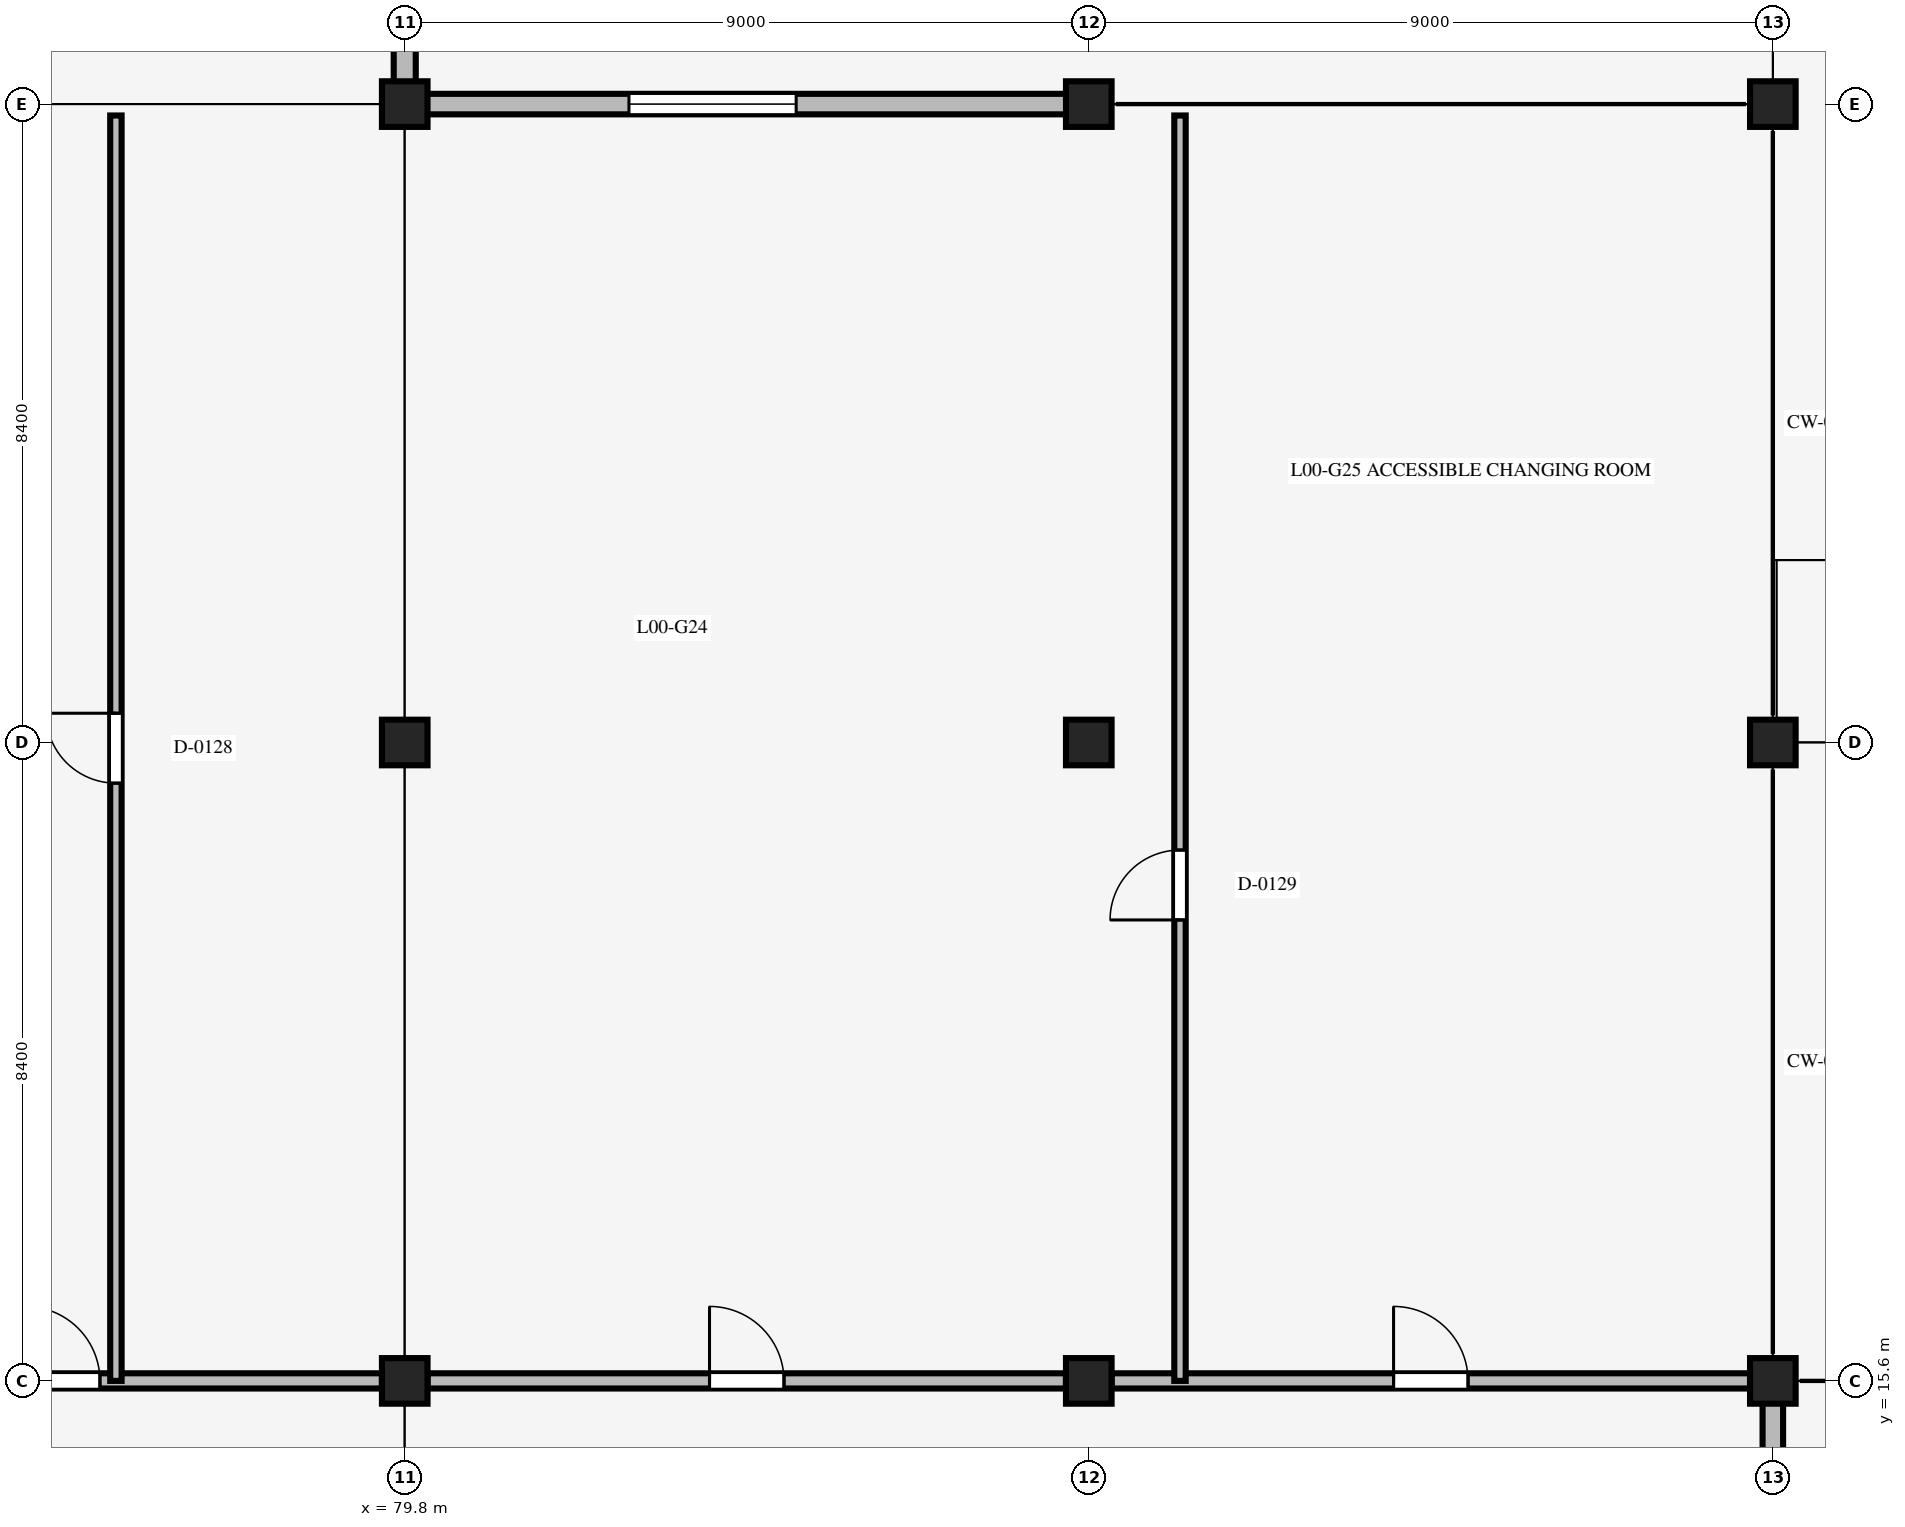
"""IFC4 building model, lengths in metres.
Left out: names, types, materials, properties, quantities, classifications, styles, units other than length and angle.
Written with IfcOpenShell. Run it as: python <this file> out.ifc"""

import sys

from ifc_helpers import new_model, si_unit, direction, frame, frame_2d, origin, origin_2d, place, context, subcontext, project, spatial, rectangle, extrude, element, fill, save


model = new_model("IFC4")
c1 = context("Model", 3, precision=1e-05, world=origin(), true_north=direction((0.0, 1.0)))
c2 = subcontext(c1, "Body", "Model", "MODEL_VIEW")
j1 = project(units=[si_unit("LENGTHUNIT", "METRE"), si_unit("PLANEANGLEUNIT", "RADIAN")], contexts=[c1])
p1 = place(None, origin())
s1 = spatial("IfcSite", under=j1, at=p1, CompositionType="ELEMENT")
p2 = place(p1, origin())
s2 = spatial("IfcBuilding", under=s1, at=p2, CompositionType="ELEMENT")
p3 = place(p2, origin())
s3 = spatial("IfcBuildingStorey", under=s2, at=p3, CompositionType="ELEMENT", Elevation=0.0)
for number, where, z_axis, x_axis in (
    (1, (79.8, 32.4, 0.0), (0.0, 0.0, 1.0), (1.0, 0.0, 0.0)),
    (2, (79.8, 15.6, 0.0), (0.0, 0.0, 1.0), (1.0, 0.0, 0.0)),
    (3, (79.8, 24.0, 0.0), (0.0, 0.0, 1.0), (1.0, 0.0, 0.0)),
    (4, (88.8, 15.6, 0.0), (0.0, 0.0, 1.0), (1.0, 0.0, 0.0)),
    (5, (88.8, 24.0, 0.0), (0.0, 0.0, 1.0), (1.0, 0.0, 0.0)),
    (6, (88.8, 32.4, 0.0), (0.0, 0.0, 1.0), (1.0, 0.0, 0.0)),
    (7, (97.8, 15.6, 0.0), (0.0, 0.0, 1.0), (1.0, 0.0, 0.0)),
    (8, (97.8, 24.0, 0.0), (0.0, 0.0, 1.0), (1.0, 0.0, 0.0)),
    (9, (97.8, 32.4, 0.0), (0.0, 0.0, 1.0), (1.0, 0.0, 0.0)),
):
    element("IfcColumn", number, at=place(p3, frame(where, z_axis=z_axis, x_axis=x_axis)), inside=s3, PredefinedType="COLUMN", context=c2, shape_type="SweptSolid", body=[
        extrude(rectangle(XDim=0.6, YDim=0.6, at=origin_2d()), origin(), (0.0, 0.0, 1.0), 6.0),
    ])
p4 = place(p3, frame((79.8, 40.45, 0.0), z_axis=(0.0, 0.0, 1.0), x_axis=(0.0, -1.0, 0.0)))
e10 = element("IfcWall", 10, at=p4, inside=s3, PredefinedType="STANDARD", context=c2, shape_type="SweptSolid", body=[
    extrude(rectangle(XDim=7.76, YDim=0.29, at=frame_2d((3.88, 0.0))), origin(), (0.0, 0.0, 1.0), 5.211),
])
p5 = place(p4, frame((2.75, 0.0, 0.0)))
e11 = element("IfcOpeningElement", 11, at=p5, cuts=e10, PredefinedType="OPENING", context=c2, shape_type="SweptSolid", body=[
    extrude(rectangle(XDim=2.2, YDim=2.6, at=frame_2d((1.1, 1.3))), frame((0.0, 0.155, 0.0), z_axis=(0.0, -1.0, 0.0), x_axis=(1.0, 0.0, 0.0)), (0.0, 0.0, 1.0), 0.31),
])
p6 = place(p3, frame((80.09, 32.4, 0.0), z_axis=(0.0, 0.0, 1.0), x_axis=(1.0, 0.0, 0.0)))
e12 = element("IfcWall", 12, at=p6, inside=s3, PredefinedType="STANDARD", context=c2, shape_type="SweptSolid", body=[
    extrude(rectangle(XDim=8.42, YDim=0.27, at=frame_2d((4.21, 0.0))), origin(), (0.0, 0.0, 1.0), 5.381),
])
p7 = place(p6, frame((2.66, 0.0, 0.95)))
e13 = element("IfcOpeningElement", 13, at=p7, cuts=e12, PredefinedType="OPENING", context=c2, shape_type="SweptSolid", body=[
    extrude(rectangle(XDim=2.2, YDim=1.9, at=frame_2d((1.1, 0.95))), frame((0.0, 0.145, 0.0), z_axis=(0.0, -1.0, 0.0), x_axis=(1.0, 0.0, 0.0)), (0.0, 0.0, 1.0), 0.29),
])
p8 = place(p3, frame((97.8, 15.31, 0.0), z_axis=(0.0, 0.0, 1.0), x_axis=(0.0, -1.0, 0.0)))
e14 = element("IfcWall", 14, at=p8, inside=s3, PredefinedType="STANDARD", context=c2, shape_type="SweptSolid", body=[
    extrude(rectangle(XDim=6.62, YDim=0.27, at=frame_2d((3.31, 0.0))), origin(), (0.0, 0.0, 1.0), 4.701),
])
p9 = place(p8, frame((3.31, 0.0, 0.0)))
e15 = element("IfcOpeningElement", 15, at=p9, cuts=e14, PredefinedType="OPENING", context=c2, shape_type="SweptSolid", body=[
    extrude(rectangle(XDim=2.0, YDim=2.4, at=frame_2d((1.0, 1.2))), frame((0.0, 0.145, 0.0), z_axis=(0.0, -1.0, 0.0), x_axis=(1.0, 0.0, 0.0)), (0.0, 0.0, 1.0), 0.29),
])
p10 = place(p3, frame((71.7, 15.6, 0.0), z_axis=(0.0, 0.0, 1.0), x_axis=(1.0, 0.0, 0.0)))
e16 = element("IfcWall", 16, at=p10, inside=s3, PredefinedType="STANDARD", context=c2, shape_type="SweptSolid", body=[
    extrude(rectangle(XDim=7.8, YDim=0.2, at=frame_2d((3.9, 0.0))), origin(), (0.0, 0.0, 1.0), 3.05),
])
p11 = place(p10, frame((3.11, 0.0, 0.0)))
e17 = element("IfcOpeningElement", 17, at=p11, cuts=e16, PredefinedType="OPENING", context=c2, shape_type="SweptSolid", body=[
    extrude(rectangle(XDim=0.98, YDim=2.15, at=frame_2d((0.49, 1.075))), frame((0.0, 0.11, 0.0), z_axis=(0.0, -1.0, 0.0), x_axis=(1.0, 0.0, 0.0)), (0.0, 0.0, 1.0), 0.22),
])
p12 = place(p3, frame((80.1, 15.6, 0.0), z_axis=(0.0, 0.0, 1.0), x_axis=(1.0, 0.0, 0.0)))
e18 = element("IfcWall", 18, at=p12, inside=s3, PredefinedType="STANDARD", context=c2, shape_type="SweptSolid", body=[
    extrude(rectangle(XDim=8.4, YDim=0.2, at=frame_2d((4.2, 0.0))), origin(), (0.0, 0.0, 1.0), 3.05),
])
p13 = place(p12, frame((3.71, 0.0, 0.0)))
e19 = element("IfcOpeningElement", 19, at=p13, cuts=e18, PredefinedType="OPENING", context=c2, shape_type="SweptSolid", body=[
    extrude(rectangle(XDim=0.98, YDim=2.15, at=frame_2d((0.49, 1.075))), frame((0.0, 0.11, 0.0), z_axis=(0.0, -1.0, 0.0), x_axis=(1.0, 0.0, 0.0)), (0.0, 0.0, 1.0), 0.22),
])
p14 = place(p3, frame((89.1, 15.6, 0.0), z_axis=(0.0, 0.0, 1.0), x_axis=(1.0, 0.0, 0.0)))
e20 = element("IfcWall", 20, at=p14, inside=s3, PredefinedType="STANDARD", context=c2, shape_type="SweptSolid", body=[
    extrude(rectangle(XDim=8.4, YDim=0.2, at=frame_2d((4.2, 0.0))), origin(), (0.0, 0.0, 1.0), 3.05),
])
p15 = place(p14, frame((3.71, 0.0, 0.0)))
e21 = element("IfcOpeningElement", 21, at=p15, cuts=e20, PredefinedType="OPENING", context=c2, shape_type="SweptSolid", body=[
    extrude(rectangle(XDim=0.98, YDim=2.15, at=frame_2d((0.49, 1.075))), frame((0.0, 0.11, 0.0), z_axis=(0.0, -1.0, 0.0), x_axis=(1.0, 0.0, 0.0)), (0.0, 0.0, 1.0), 0.22),
])
p16 = place(p3, frame((76.0, 15.6, 0.0), z_axis=(0.0, 0.0, 1.0), x_axis=(0.0, 1.0, 0.0)))
e22 = element("IfcWall", 22, at=p16, inside=s3, PredefinedType="STANDARD", context=c2, shape_type="SweptSolid", body=[
    extrude(rectangle(XDim=16.65, YDim=0.15, at=frame_2d((8.325, 0.0))), origin(), (0.0, 0.0, 1.0), 3.05),
])
p17 = place(p16, frame((7.865, 0.0, 0.0)))
e23 = element("IfcOpeningElement", 23, at=p17, cuts=e22, PredefinedType="OPENING", context=c2, shape_type="SweptSolid", body=[
    extrude(rectangle(XDim=0.92, YDim=2.15, at=frame_2d((0.46, 1.075))), frame((0.0, 0.085, 0.0), z_axis=(0.0, -1.0, 0.0), x_axis=(1.0, 0.0, 0.0)), (0.0, 0.0, 1.0), 0.17),
])
p18 = place(p3, frame((90.0, 15.6, 0.0), z_axis=(0.0, 0.0, 1.0), x_axis=(0.0, 1.0, 0.0)))
e24 = element("IfcWall", 24, at=p18, inside=s3, PredefinedType="STANDARD", context=c2, shape_type="SweptSolid", body=[
    extrude(rectangle(XDim=16.65, YDim=0.15, at=frame_2d((8.325, 0.0))), origin(), (0.0, 0.0, 1.0), 3.05),
])
p19 = place(p18, frame((6.065, 0.0, 0.0)))
e25 = element("IfcOpeningElement", 25, at=p19, cuts=e24, PredefinedType="OPENING", context=c2, shape_type="SweptSolid", body=[
    extrude(rectangle(XDim=0.92, YDim=2.15, at=frame_2d((0.46, 1.075))), frame((0.0, 0.085, 0.0), z_axis=(0.0, -1.0, 0.0), x_axis=(1.0, 0.0, 0.0)), (0.0, 0.0, 1.0), 0.17),
])
p20 = place(p7, origin())
e26 = element("IfcWindow", 26, at=p20, inside=s3, PartitioningType="SINGLE_PANEL", PredefinedType="WINDOW", context=c2, shape_type="SweptSolid", body=[
    extrude(rectangle(XDim=2.2, YDim=1.9, at=frame_2d((1.1, 0.95))), frame((0.0, 0.03, 0.0), z_axis=(0.0, -1.0, 0.0), x_axis=(1.0, 0.0, 0.0)), (0.0, 0.0, 1.0), 0.06),
])
fill(e13, e26)
p21 = place(p11, origin())
e27 = element("IfcDoor", 27, at=p21, inside=s3, OperationType="SINGLE_SWING_LEFT", PredefinedType="DOOR", context=c2, shape_type="SweptSolid", body=[
    extrude(rectangle(XDim=0.98, YDim=2.15, at=frame_2d((0.49, 1.075))), frame((0.0, 0.025, 0.0), z_axis=(0.0, -1.0, 0.0), x_axis=(1.0, 0.0, 0.0)), (0.0, 0.0, 1.0), 0.05),
])
fill(e17, e27)
p22 = place(p13, origin())
e28 = element("IfcDoor", 28, at=p22, inside=s3, OperationType="SINGLE_SWING_LEFT", PredefinedType="DOOR", context=c2, shape_type="SweptSolid", body=[
    extrude(rectangle(XDim=0.98, YDim=2.15, at=frame_2d((0.49, 1.075))), frame((0.0, 0.025, 0.0), z_axis=(0.0, -1.0, 0.0), x_axis=(1.0, 0.0, 0.0)), (0.0, 0.0, 1.0), 0.05),
])
fill(e19, e28)
p23 = place(p15, origin())
e29 = element("IfcDoor", 29, at=p23, inside=s3, OperationType="SINGLE_SWING_LEFT", PredefinedType="DOOR", context=c2, shape_type="SweptSolid", body=[
    extrude(rectangle(XDim=0.98, YDim=2.15, at=frame_2d((0.49, 1.075))), frame((0.0, 0.025, 0.0), z_axis=(0.0, -1.0, 0.0), x_axis=(1.0, 0.0, 0.0)), (0.0, 0.0, 1.0), 0.05),
])
fill(e21, e29)
p24 = place(p17, origin())
e30 = element("IfcDoor", 30, at=p24, inside=s3, OperationType="SINGLE_SWING_RIGHT", PredefinedType="DOOR", context=c2, shape_type="SweptSolid", body=[
    extrude(rectangle(XDim=0.92, YDim=2.15, at=frame_2d((0.46, 1.075))), frame((0.0, 0.025, 0.0), z_axis=(0.0, -1.0, 0.0), x_axis=(1.0, 0.0, 0.0)), (0.0, 0.0, 1.0), 0.05),
])
fill(e23, e30)
p25 = place(p19, origin())
e31 = element("IfcDoor", 31, at=p25, inside=s3, OperationType="SINGLE_SWING_LEFT", PredefinedType="DOOR", context=c2, shape_type="SweptSolid", body=[
    extrude(rectangle(XDim=0.92, YDim=2.15, at=frame_2d((0.46, 1.075))), frame((0.0, 0.025, 0.0), z_axis=(0.0, -1.0, 0.0), x_axis=(1.0, 0.0, 0.0)), (0.0, 0.0, 1.0), 0.05),
])
fill(e25, e31)
save(model, sys.argv[1])
